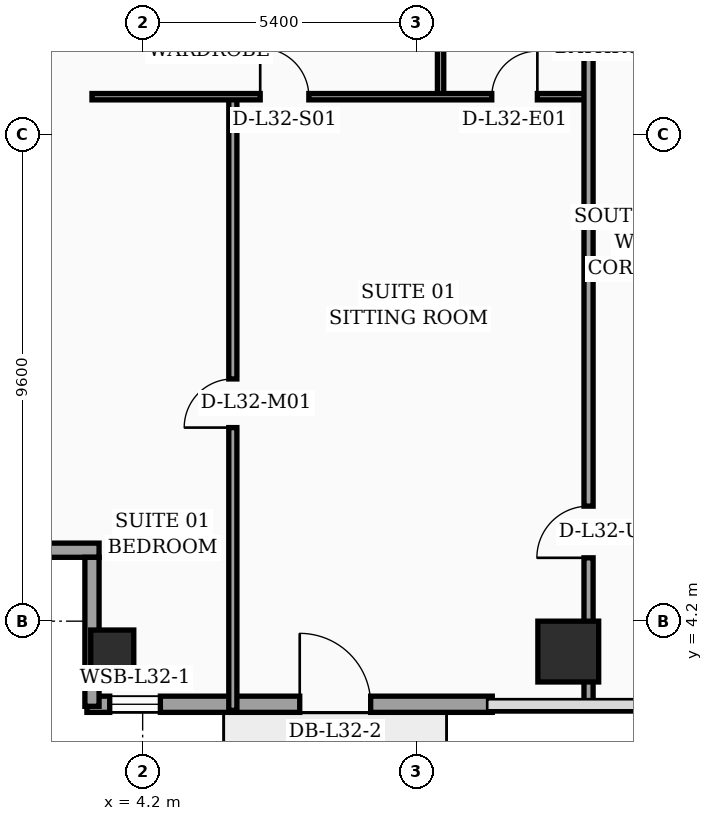
"""IFC4 building model, lengths in metres.
Left out: names, types, materials, properties, quantities, classifications, styles, units other than length and angle.
Written with IfcOpenShell. Run it as: python <this file> out.ifc"""

import sys

from ifc_helpers import new_model, si_unit, direction, frame, frame_2d, origin, origin_2d, place, context, subcontext, project, spatial, rectangle, hollow_rectangle, extrude, element, fill, save


model = new_model("IFC4")
c1 = context("Model", 3, precision=1e-05, world=origin(), true_north=direction((0.0, 1.0)))
c2 = subcontext(c1, "Body", "Model", "MODEL_VIEW")
j1 = project(units=[si_unit("LENGTHUNIT", "METRE"), si_unit("PLANEANGLEUNIT", "RADIAN")], contexts=[c1])
p1 = place(None, origin())
s1 = spatial("IfcSite", under=j1, at=p1, CompositionType="ELEMENT")
p2 = place(p1, origin())
s2 = spatial("IfcBuilding", under=s1, at=p2, CompositionType="ELEMENT")
p3 = place(p2, frame((0.0, 0.0, 131.6)))
s3 = spatial("IfcBuildingStorey", under=s2, at=p3, CompositionType="ELEMENT", Elevation=131.6)
p4 = place(p3, frame((3.6, 3.6, 0.0), z_axis=(0.0, 0.0, 1.0), x_axis=(1.0, 0.0, 0.0)))
e1 = element("IfcColumn", 1, at=p4, inside=s3, PredefinedType="COLUMN", context=c2, shape_type="SweptSolid", body=[
    extrude(hollow_rectangle(XDim=0.85, YDim=0.85, WallThickness=0.036, at=origin_2d()), origin(), (0.0, 0.0, 1.0), 3.56),
])
p5 = place(p3, frame((12.6, 3.6, 0.0), z_axis=(0.0, 0.0, 1.0), x_axis=(1.0, 0.0, 0.0)))
e2 = element("IfcColumn", 2, at=p5, inside=s3, PredefinedType="COLUMN", context=c2, shape_type="SweptSolid", body=[
    extrude(rectangle(XDim=1.2, YDim=1.2, at=origin_2d()), origin(), (0.0, 0.0, 1.0), 3.56),
])
p6 = place(p3, frame((3.1, 2.56, 0.0), z_axis=(0.0, 0.0, 1.0), x_axis=(1.0, 0.0, 0.0)))
e3 = element("IfcWall", 3, at=p6, inside=s3, PredefinedType="SOLIDWALL", context=c2, shape_type="SweptSolid", body=[
    extrude(rectangle(XDim=8.0, YDim=0.32, at=frame_2d((4.0, 0.0))), origin(), (0.0, 0.0, 1.0), 3.56),
])
p7 = place(p6, frame((0.45, 0.0, 0.75)))
e4 = element("IfcOpeningElement", 4, at=p7, cuts=e3, PredefinedType="OPENING", context=c2, shape_type="SweptSolid", body=[
    extrude(rectangle(XDim=1.0, YDim=1.6, at=frame_2d((0.5, 0.8))), frame((0.0, 0.17, 0.0), z_axis=(0.0, -1.0, 0.0), x_axis=(1.0, 0.0, 0.0)), (0.0, 0.0, 1.0), 0.34),
])
p8 = place(p6, frame((4.2, 0.0, 0.0)))
e5 = element("IfcOpeningElement", 5, at=p8, cuts=e3, PredefinedType="OPENING", context=c2, shape_type="SweptSolid", body=[
    extrude(rectangle(XDim=1.4, YDim=2.25, at=frame_2d((0.7, 1.125))), frame((0.0, 0.17, 0.0), z_axis=(0.0, -1.0, 0.0), x_axis=(1.0, 0.0, 0.0)), (0.0, 0.0, 1.0), 0.34),
])
p9 = place(p3, frame((0.12, 5.6, 0.0), z_axis=(0.0, 0.0, 1.0), x_axis=(1.0, 0.0, 0.0)))
e6 = element("IfcWall", 6, at=p9, inside=s3, PredefinedType="SOLIDWALL", context=c2, shape_type="SweptSolid", body=[
    extrude(rectangle(XDim=3.22, YDim=0.28, at=frame_2d((1.61, 0.0))), origin(), (0.0, 0.0, 1.0), 2.84),
])
p10 = place(p3, frame((3.2, 5.46, 0.0), z_axis=(0.0, 0.0, 1.0), x_axis=(0.0, -1.0, 0.0)))
e7 = element("IfcWall", 7, at=p10, inside=s3, PredefinedType="SOLIDWALL", context=c2, shape_type="SweptSolid", body=[
    extrude(rectangle(XDim=2.94, YDim=0.28, at=frame_2d((1.47, 0.0))), origin(), (0.0, 0.0, 1.0), 2.84),
])
p11 = place(p3, frame((10.08, 14.55, 0.0), z_axis=(0.0, 0.0, 1.0), x_axis=(0.0, 1.0, 0.0)))
e8 = element("IfcWall", 8, at=p11, inside=s3, PredefinedType="PARTITIONING", context=c2, shape_type="SweptSolid", body=[
    extrude(rectangle(XDim=2.25, YDim=0.125, at=frame_2d((1.125, 0.0))), origin(), (0.0, 0.0, 1.0), 3.56),
])
p12 = place(p3, frame((5.98, 2.44, 0.0), z_axis=(0.0, 0.0, 1.0), x_axis=(0.0, 1.0, 0.0)))
e9 = element("IfcWall", 9, at=p12, inside=s3, PredefinedType="PARTITIONING", context=c2, shape_type="SweptSolid", body=[
    extrude(rectangle(XDim=12.11, YDim=0.16, at=frame_2d((6.055, 0.0))), origin(), (0.0, 0.0, 1.0), 3.04),
])
p13 = place(p12, frame((5.58, 0.0, 0.0)))
e10 = element("IfcOpeningElement", 10, at=p13, cuts=e9, PredefinedType="OPENING", context=c2, shape_type="SweptSolid", body=[
    extrude(rectangle(XDim=0.96, YDim=2.2, at=frame_2d((0.48, 1.1))), frame((0.0, 0.09, 0.0), z_axis=(0.0, -1.0, 0.0), x_axis=(1.0, 0.0, 0.0)), (0.0, 0.0, 1.0), 0.18),
])
p14 = place(p3, frame((3.2, 14.55, 0.0), z_axis=(0.0, 0.0, 1.0), x_axis=(1.0, 0.0, 0.0)))
e11 = element("IfcWall", 11, at=p14, inside=s3, PredefinedType="PARTITIONING", context=c2, shape_type="SweptSolid", body=[
    extrude(rectangle(XDim=9.8, YDim=0.125, at=frame_2d((4.9, 0.0))), origin(), (0.0, 0.0, 1.0), 2.84),
])
p15 = place(p14, frame((3.32, 0.0, 0.0)))
e12 = element("IfcOpeningElement", 12, at=p15, cuts=e11, PredefinedType="OPENING", context=c2, shape_type="SweptSolid", body=[
    extrude(rectangle(XDim=0.96, YDim=2.2, at=frame_2d((0.48, 1.1))), frame((0.0, 0.073, 0.0), z_axis=(0.0, -1.0, 0.0), x_axis=(1.0, 0.0, 0.0)), (0.0, 0.0, 1.0), 0.145),
])
p16 = place(p14, frame((7.89, 0.0, 0.0)))
e13 = element("IfcOpeningElement", 13, at=p16, cuts=e11, PredefinedType="OPENING", context=c2, shape_type="SweptSolid", body=[
    extrude(rectangle(XDim=0.9, YDim=2.15, at=frame_2d((0.45, 1.075))), frame((0.0, 0.073, 0.0), z_axis=(0.0, -1.0, 0.0), x_axis=(1.0, 0.0, 0.0)), (0.0, 0.0, 1.0), 0.145),
])
p17 = place(p3, frame((13.0, 2.44, 0.0), z_axis=(0.0, 0.0, 1.0), x_axis=(0.0, 1.0, 0.0)))
e14 = element("IfcWall", 14, at=p17, inside=s3, PredefinedType="PARTITIONING", context=c2, shape_type="SweptSolid", body=[
    extrude(rectangle(XDim=14.36, YDim=0.18, at=frame_2d((7.18, 0.0))), origin(), (0.0, 0.0, 1.0), 2.84),
])
p18 = place(p17, frame((3.01, 0.0, 0.0)))
e15 = element("IfcOpeningElement", 15, at=p18, cuts=e14, PredefinedType="OPENING", context=c2, shape_type="SweptSolid", body=[
    extrude(rectangle(XDim=1.02, YDim=2.2, at=frame_2d((0.51, 1.1))), frame((0.0, 0.1, 0.0), z_axis=(0.0, -1.0, 0.0), x_axis=(1.0, 0.0, 0.0)), (0.0, 0.0, 1.0), 0.2),
])
p19 = place(p7, origin())
e16 = element("IfcWindow", 16, at=p19, inside=s3, PartitioningType="SINGLE_PANEL", PredefinedType="WINDOW", context=c2, shape_type="SweptSolid", body=[
    extrude(rectangle(XDim=1.0, YDim=1.6, at=frame_2d((0.5, 0.8))), frame((0.0, 0.03, 0.0), z_axis=(0.0, -1.0, 0.0), x_axis=(1.0, 0.0, 0.0)), (0.0, 0.0, 1.0), 0.06),
])
fill(e4, e16)
p20 = place(p8, origin())
e17 = element("IfcDoor", 17, at=p20, inside=s3, OperationType="SINGLE_SWING_LEFT", PredefinedType="DOOR", context=c2, shape_type="SweptSolid", body=[
    extrude(rectangle(XDim=1.4, YDim=2.25, at=frame_2d((0.7, 1.125))), frame((0.0, 0.025, 0.0), z_axis=(0.0, -1.0, 0.0), x_axis=(1.0, 0.0, 0.0)), (0.0, 0.0, 1.0), 0.05),
])
fill(e5, e17)
p21 = place(p13, origin())
e18 = element("IfcDoor", 18, at=p21, inside=s3, OperationType="SINGLE_SWING_LEFT", PredefinedType="DOOR", context=c2, shape_type="SweptSolid", body=[
    extrude(rectangle(XDim=0.96, YDim=2.2, at=frame_2d((0.48, 1.1))), frame((0.0, 0.025, 0.0), z_axis=(0.0, -1.0, 0.0), x_axis=(1.0, 0.0, 0.0)), (0.0, 0.0, 1.0), 0.05),
])
fill(e10, e18)
p22 = place(p15, origin())
e19 = element("IfcDoor", 19, at=p22, inside=s3, OperationType="SINGLE_SWING_LEFT", PredefinedType="DOOR", context=c2, shape_type="SweptSolid", body=[
    extrude(rectangle(XDim=0.96, YDim=2.2, at=frame_2d((0.48, 1.1))), frame((0.0, 0.025, 0.0), z_axis=(0.0, -1.0, 0.0), x_axis=(1.0, 0.0, 0.0)), (0.0, 0.0, 1.0), 0.05),
])
fill(e12, e19)
p23 = place(p16, origin())
e20 = element("IfcDoor", 20, at=p23, inside=s3, OperationType="SINGLE_SWING_RIGHT", PredefinedType="DOOR", context=c2, shape_type="SweptSolid", body=[
    extrude(rectangle(XDim=0.9, YDim=2.15, at=frame_2d((0.45, 1.075))), frame((0.0, 0.025, 0.0), z_axis=(0.0, -1.0, 0.0), x_axis=(1.0, 0.0, 0.0)), (0.0, 0.0, 1.0), 0.05),
])
fill(e13, e20)
p24 = place(p18, origin())
e21 = element("IfcDoor", 21, at=p24, inside=s3, OperationType="SINGLE_SWING_LEFT", PredefinedType="DOOR", context=c2, shape_type="SweptSolid", body=[
    extrude(rectangle(XDim=1.02, YDim=2.2, at=frame_2d((0.51, 1.1))), frame((0.0, 0.025, 0.0), z_axis=(0.0, -1.0, 0.0), x_axis=(1.0, 0.0, 0.0)), (0.0, 0.0, 1.0), 0.05),
])
fill(e15, e21)
save(model, sys.argv[1])
